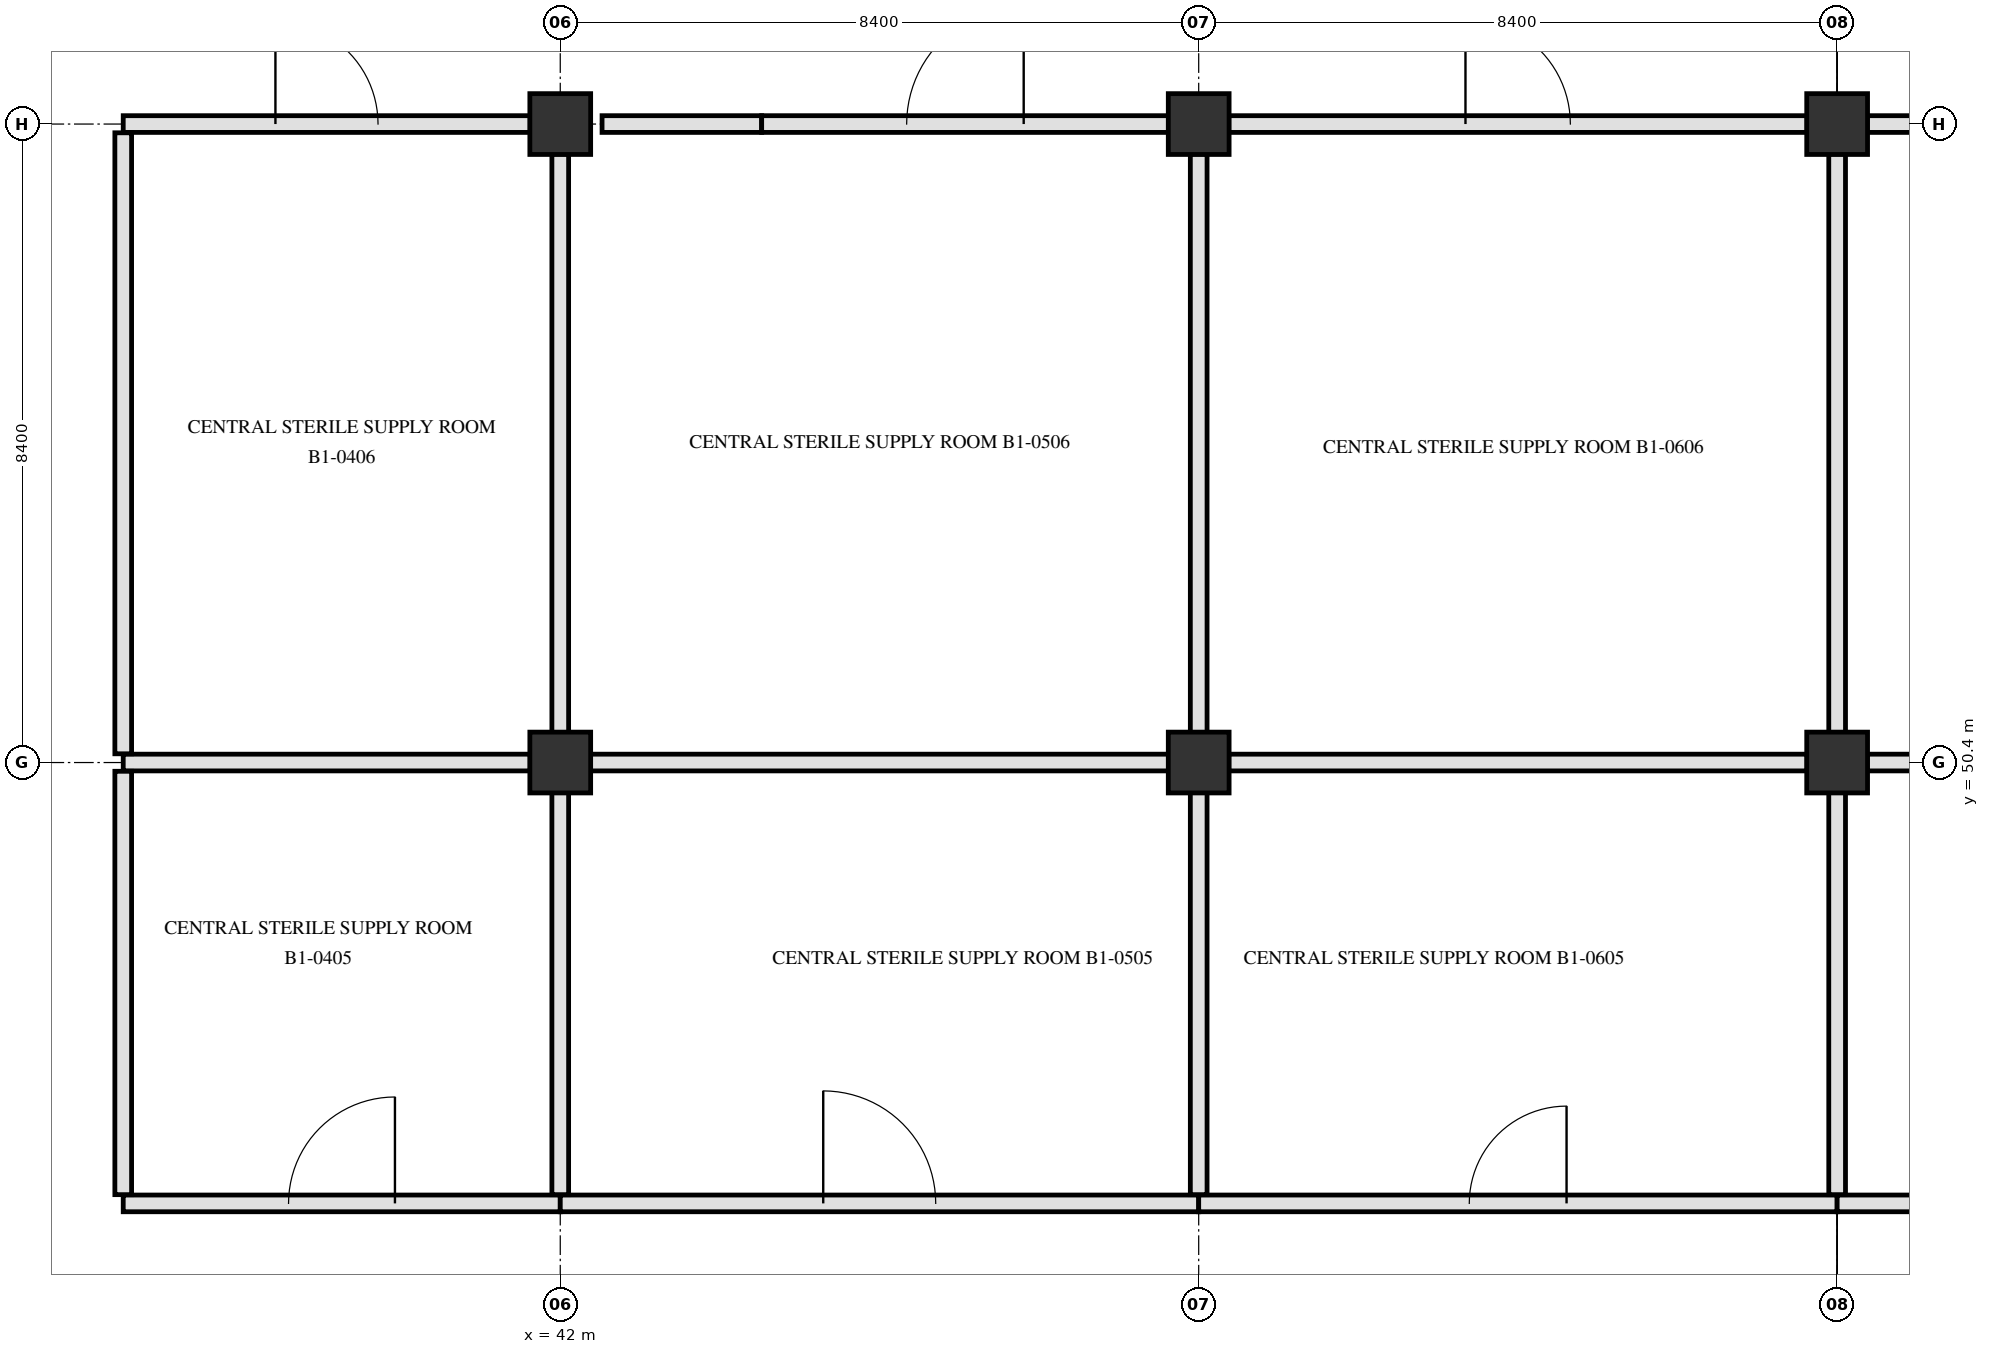
"""IFC4 building model, lengths in metres.
Left out: names, types, materials, properties, quantities, classifications, styles, units other than length and angle.
Written with IfcOpenShell. Run it as: python <this file> out.ifc"""

import sys

from ifc_helpers import new_model, si_unit, direction, frame, frame_2d, origin, origin_2d, place, context, subcontext, project, spatial, rectangle, extrude, element, fill, save


model = new_model("IFC4")
c1 = context("Model", 3, precision=1e-05, world=origin(), true_north=direction((0.0, 1.0)))
c2 = subcontext(c1, "Body", "Model", "MODEL_VIEW")
j1 = project(units=[si_unit("LENGTHUNIT", "METRE"), si_unit("PLANEANGLEUNIT", "RADIAN")], contexts=[c1])
p1 = place(None, origin())
s1 = spatial("IfcSite", under=j1, at=p1, CompositionType="ELEMENT")
p2 = place(p1, origin())
s2 = spatial("IfcBuilding", under=s1, at=p2, CompositionType="ELEMENT")
p3 = place(p2, frame((0.0, 0.0, -5.4)))
s3 = spatial("IfcBuildingStorey", under=s2, at=p3, CompositionType="ELEMENT", Elevation=-5.4)
for number, where, z_axis, x_axis in (
    (1, (42.0, 50.4, 0.0), (0.0, 0.0, 1.0), (1.0, 0.0, 0.0)),
    (2, (42.0, 58.8, 0.0), (0.0, 0.0, 1.0), (1.0, 0.0, 0.0)),
    (3, (50.4, 50.4, 0.0), (0.0, 0.0, 1.0), (1.0, 0.0, 0.0)),
    (4, (50.4, 58.8, 0.0), (0.0, 0.0, 1.0), (1.0, 0.0, 0.0)),
    (5, (58.8, 50.4, 0.0), (0.0, 0.0, 1.0), (1.0, 0.0, 0.0)),
    (6, (58.8, 58.8, 0.0), (0.0, 0.0, 1.0), (1.0, 0.0, 0.0)),
):
    element("IfcColumn", number, at=place(p3, frame(where, z_axis=z_axis, x_axis=x_axis)), inside=s3, PredefinedType="COLUMN", context=c2, shape_type="SweptSolid", body=[
        extrude(rectangle(XDim=0.8, YDim=0.8, at=origin_2d()), origin(), (0.0, 0.0, 1.0), 5.4),
    ])
p4 = place(p3, frame((36.25, 44.6, 0.0), z_axis=(0.0, 0.0, 1.0), x_axis=(1.0, 0.0, 0.0)))
e7 = element("IfcWall", 7, at=p4, inside=s3, PredefinedType="PARTITIONING", context=c2, shape_type="SweptSolid", body=[
    extrude(rectangle(XDim=5.75, YDim=0.22, at=frame_2d((2.875, 0.0))), origin(), (0.0, 0.0, 1.0), 4.47),
])
p5 = place(p4, frame((2.175, 0.0, 0.0)))
e8 = element("IfcOpeningElement", 8, at=p5, cuts=e7, PredefinedType="OPENING", context=c2, shape_type="SweptSolid", body=[
    extrude(rectangle(XDim=1.4, YDim=2.2, at=frame_2d((0.7, 1.1))), frame((0.0, 0.12, 0.0), z_axis=(0.0, -1.0, 0.0), x_axis=(1.0, 0.0, 0.0)), (0.0, 0.0, 1.0), 0.24),
])
p6 = place(p3, frame((42.0, 44.6, 0.0), z_axis=(0.0, 0.0, 1.0), x_axis=(1.0, 0.0, 0.0)))
e9 = element("IfcWall", 9, at=p6, inside=s3, PredefinedType="PARTITIONING", context=c2, shape_type="SweptSolid", body=[
    extrude(rectangle(XDim=8.4, YDim=0.22, at=frame_2d((4.2, 0.0))), origin(), (0.0, 0.0, 1.0), 4.47),
])
p7 = place(p6, frame((3.46, 0.0, 0.0)))
e10 = element("IfcOpeningElement", 10, at=p7, cuts=e9, PredefinedType="OPENING", context=c2, shape_type="SweptSolid", body=[
    extrude(rectangle(XDim=1.48, YDim=2.22, at=frame_2d((0.74, 1.11))), frame((0.0, 0.12, 0.0), z_axis=(0.0, -1.0, 0.0), x_axis=(1.0, 0.0, 0.0)), (0.0, 0.0, 1.0), 0.24),
])
p8 = place(p3, frame((50.4, 44.6, 0.0), z_axis=(0.0, 0.0, 1.0), x_axis=(1.0, 0.0, 0.0)))
e11 = element("IfcWall", 11, at=p8, inside=s3, PredefinedType="PARTITIONING", context=c2, shape_type="SweptSolid", body=[
    extrude(rectangle(XDim=8.4, YDim=0.22, at=frame_2d((4.2, 0.0))), origin(), (0.0, 0.0, 1.0), 4.47),
])
p9 = place(p8, frame((3.56, 0.0, 0.0)))
e12 = element("IfcOpeningElement", 12, at=p9, cuts=e11, PredefinedType="OPENING", context=c2, shape_type="SweptSolid", body=[
    extrude(rectangle(XDim=1.28, YDim=2.18, at=frame_2d((0.64, 1.09))), frame((0.0, 0.12, 0.0), z_axis=(0.0, -1.0, 0.0), x_axis=(1.0, 0.0, 0.0)), (0.0, 0.0, 1.0), 0.24),
])
p10 = place(p3, frame((58.8, 44.6, 0.0), z_axis=(0.0, 0.0, 1.0), x_axis=(1.0, 0.0, 0.0)))
e13 = element("IfcWall", 13, at=p10, inside=s3, PredefinedType="PARTITIONING", context=c2, shape_type="SweptSolid", body=[
    extrude(rectangle(XDim=8.4, YDim=0.22, at=frame_2d((4.2, 0.0))), origin(), (0.0, 0.0, 1.0), 4.47),
])
p11 = place(p10, frame((3.725, 0.0, 0.0)))
e14 = element("IfcOpeningElement", 14, at=p11, cuts=e13, PredefinedType="OPENING", context=c2, shape_type="SweptSolid", body=[
    extrude(rectangle(XDim=0.95, YDim=2.1, at=frame_2d((0.475, 1.05))), frame((0.0, 0.12, 0.0), z_axis=(0.0, -1.0, 0.0), x_axis=(1.0, 0.0, 0.0)), (0.0, 0.0, 1.0), 0.24),
])
p12 = place(p3, frame((36.25, 50.4, 0.0), z_axis=(0.0, 0.0, 1.0), x_axis=(1.0, 0.0, 0.0)))
e15 = element("IfcWall", 15, at=p12, inside=s3, PredefinedType="PARTITIONING", context=c2, shape_type="SweptSolid", body=[
    extrude(rectangle(XDim=5.355, YDim=0.22, at=frame_2d((2.677, 0.0))), origin(), (0.0, 0.0, 1.0), 4.42),
])
p13 = place(p3, frame((42.395, 50.4, 0.0), z_axis=(0.0, 0.0, 1.0), x_axis=(1.0, 0.0, 0.0)))
e16 = element("IfcWall", 16, at=p13, inside=s3, PredefinedType="PARTITIONING", context=c2, shape_type="SweptSolid", body=[
    extrude(rectangle(XDim=7.61, YDim=0.22, at=frame_2d((3.805, 0.0))), origin(), (0.0, 0.0, 1.0), 4.42),
])
p14 = place(p3, frame((50.795, 50.4, 0.0), z_axis=(0.0, 0.0, 1.0), x_axis=(1.0, 0.0, 0.0)))
e17 = element("IfcWall", 17, at=p14, inside=s3, PredefinedType="PARTITIONING", context=c2, shape_type="SweptSolid", body=[
    extrude(rectangle(XDim=7.61, YDim=0.22, at=frame_2d((3.805, 0.0))), origin(), (0.0, 0.0, 1.0), 4.42),
])
p15 = place(p3, frame((59.195, 50.4, 0.0), z_axis=(0.0, 0.0, 1.0), x_axis=(1.0, 0.0, 0.0)))
e18 = element("IfcWall", 18, at=p15, inside=s3, PredefinedType="PARTITIONING", context=c2, shape_type="SweptSolid", body=[
    extrude(rectangle(XDim=7.61, YDim=0.22, at=frame_2d((3.805, 0.0))), origin(), (0.0, 0.0, 1.0), 4.42),
])
p16 = place(p3, frame((36.25, 58.8, 0.0), z_axis=(0.0, 0.0, 1.0), x_axis=(1.0, 0.0, 0.0)))
e19 = element("IfcWall", 19, at=p16, inside=s3, PredefinedType="PARTITIONING", context=c2, shape_type="SweptSolid", body=[
    extrude(rectangle(XDim=5.355, YDim=0.22, at=frame_2d((2.677, 0.0))), origin(), (0.0, 0.0, 1.0), 4.42),
])
p17 = place(p16, frame((2.002, 0.0, 0.0)))
e20 = element("IfcOpeningElement", 20, at=p17, cuts=e19, PredefinedType="OPENING", context=c2, shape_type="SweptSolid", body=[
    extrude(rectangle(XDim=1.35, YDim=2.2, at=frame_2d((0.675, 1.1))), frame((0.0, 0.12, 0.0), z_axis=(0.0, -1.0, 0.0), x_axis=(1.0, 0.0, 0.0)), (0.0, 0.0, 1.0), 0.24),
])
p18 = place(p3, frame((42.55, 58.8, 0.0), z_axis=(0.0, 0.0, 1.0), x_axis=(1.0, 0.0, 0.0)))
e21 = element("IfcWall", 21, at=p18, inside=s3, PredefinedType="PARTITIONING", context=c2, shape_type="SweptSolid", body=[
    extrude(rectangle(XDim=2.1, YDim=0.22, at=frame_2d((1.05, 0.0))), origin(), (0.0, 0.0, 1.0), 4.42),
])
p19 = place(p3, frame((44.65, 58.8, 0.0), z_axis=(0.0, 0.0, 1.0), x_axis=(1.0, 0.0, 0.0)))
e22 = element("IfcWall", 22, at=p19, inside=s3, PredefinedType="PARTITIONING", context=c2, shape_type="SweptSolid", body=[
    extrude(rectangle(XDim=5.355, YDim=0.22, at=frame_2d((2.677, 0.0))), origin(), (0.0, 0.0, 1.0), 4.42),
])
p20 = place(p19, frame((1.907, 0.0, 0.0)))
e23 = element("IfcOpeningElement", 23, at=p20, cuts=e22, PredefinedType="OPENING", context=c2, shape_type="SweptSolid", body=[
    extrude(rectangle(XDim=1.54, YDim=2.24, at=frame_2d((0.77, 1.12))), frame((0.0, 0.12, 0.0), z_axis=(0.0, -1.0, 0.0), x_axis=(1.0, 0.0, 0.0)), (0.0, 0.0, 1.0), 0.24),
])
p21 = place(p3, frame((50.795, 58.8, 0.0), z_axis=(0.0, 0.0, 1.0), x_axis=(1.0, 0.0, 0.0)))
e24 = element("IfcWall", 24, at=p21, inside=s3, PredefinedType="PARTITIONING", context=c2, shape_type="SweptSolid", body=[
    extrude(rectangle(XDim=7.61, YDim=0.22, at=frame_2d((3.805, 0.0))), origin(), (0.0, 0.0, 1.0), 4.42),
])
p22 = place(p21, frame((3.115, 0.0, 0.0)))
e25 = element("IfcOpeningElement", 25, at=p22, cuts=e24, PredefinedType="OPENING", context=c2, shape_type="SweptSolid", body=[
    extrude(rectangle(XDim=1.38, YDim=2.22, at=frame_2d((0.69, 1.11))), frame((0.0, 0.12, 0.0), z_axis=(0.0, -1.0, 0.0), x_axis=(1.0, 0.0, 0.0)), (0.0, 0.0, 1.0), 0.24),
])
p23 = place(p3, frame((59.195, 58.8, 0.0), z_axis=(0.0, 0.0, 1.0), x_axis=(1.0, 0.0, 0.0)))
e26 = element("IfcWall", 26, at=p23, inside=s3, PredefinedType="PARTITIONING", context=c2, shape_type="SweptSolid", body=[
    extrude(rectangle(XDim=7.61, YDim=0.22, at=frame_2d((3.805, 0.0))), origin(), (0.0, 0.0, 1.0), 4.42),
])
p24 = place(p23, frame((3.255, 0.0, 0.0)))
e27 = element("IfcOpeningElement", 27, at=p24, cuts=e26, PredefinedType="OPENING", context=c2, shape_type="SweptSolid", body=[
    extrude(rectangle(XDim=1.1, YDim=2.15, at=frame_2d((0.55, 1.075))), frame((0.0, 0.12, 0.0), z_axis=(0.0, -1.0, 0.0), x_axis=(1.0, 0.0, 0.0)), (0.0, 0.0, 1.0), 0.24),
])
p25 = place(p3, frame((36.25, 44.715, 0.0), z_axis=(0.0, 0.0, 1.0), x_axis=(0.0, 1.0, 0.0)))
e28 = element("IfcWall", 28, at=p25, inside=s3, PredefinedType="PARTITIONING", context=c2, shape_type="SweptSolid", body=[
    extrude(rectangle(XDim=5.57, YDim=0.22, at=frame_2d((2.785, 0.0))), origin(), (0.0, 0.0, 1.0), 4.42),
])
p26 = place(p3, frame((36.25, 50.515, 0.0), z_axis=(0.0, 0.0, 1.0), x_axis=(0.0, 1.0, 0.0)))
e29 = element("IfcWall", 29, at=p26, inside=s3, PredefinedType="PARTITIONING", context=c2, shape_type="SweptSolid", body=[
    extrude(rectangle(XDim=8.17, YDim=0.22, at=frame_2d((4.085, 0.0))), origin(), (0.0, 0.0, 1.0), 4.42),
])
p27 = place(p3, frame((42.0, 44.715, 0.0), z_axis=(0.0, 0.0, 1.0), x_axis=(0.0, 1.0, 0.0)))
e30 = element("IfcWall", 30, at=p27, inside=s3, PredefinedType="PARTITIONING", context=c2, shape_type="SweptSolid", body=[
    extrude(rectangle(XDim=5.29, YDim=0.22, at=frame_2d((2.645, 0.0))), origin(), (0.0, 0.0, 1.0), 4.47),
])
p28 = place(p3, frame((42.0, 50.795, 0.0), z_axis=(0.0, 0.0, 1.0), x_axis=(0.0, 1.0, 0.0)))
e31 = element("IfcWall", 31, at=p28, inside=s3, PredefinedType="PARTITIONING", context=c2, shape_type="SweptSolid", body=[
    extrude(rectangle(XDim=7.61, YDim=0.22, at=frame_2d((3.805, 0.0))), origin(), (0.0, 0.0, 1.0), 4.47),
])
p29 = place(p3, frame((50.4, 44.715, 0.0), z_axis=(0.0, 0.0, 1.0), x_axis=(0.0, 1.0, 0.0)))
e32 = element("IfcWall", 32, at=p29, inside=s3, PredefinedType="PARTITIONING", context=c2, shape_type="SweptSolid", body=[
    extrude(rectangle(XDim=5.29, YDim=0.22, at=frame_2d((2.645, 0.0))), origin(), (0.0, 0.0, 1.0), 4.47),
])
p30 = place(p3, frame((50.4, 50.795, 0.0), z_axis=(0.0, 0.0, 1.0), x_axis=(0.0, 1.0, 0.0)))
e33 = element("IfcWall", 33, at=p30, inside=s3, PredefinedType="PARTITIONING", context=c2, shape_type="SweptSolid", body=[
    extrude(rectangle(XDim=7.61, YDim=0.22, at=frame_2d((3.805, 0.0))), origin(), (0.0, 0.0, 1.0), 4.47),
])
p31 = place(p3, frame((58.8, 44.715, 0.0), z_axis=(0.0, 0.0, 1.0), x_axis=(0.0, 1.0, 0.0)))
e34 = element("IfcWall", 34, at=p31, inside=s3, PredefinedType="PARTITIONING", context=c2, shape_type="SweptSolid", body=[
    extrude(rectangle(XDim=5.29, YDim=0.22, at=frame_2d((2.645, 0.0))), origin(), (0.0, 0.0, 1.0), 4.47),
])
p32 = place(p3, frame((58.8, 50.795, 0.0), z_axis=(0.0, 0.0, 1.0), x_axis=(0.0, 1.0, 0.0)))
e35 = element("IfcWall", 35, at=p32, inside=s3, PredefinedType="PARTITIONING", context=c2, shape_type="SweptSolid", body=[
    extrude(rectangle(XDim=7.61, YDim=0.22, at=frame_2d((3.805, 0.0))), origin(), (0.0, 0.0, 1.0), 4.47),
])
p33 = place(p5, origin())
e36 = element("IfcDoor", 36, at=p33, inside=s3, OperationType="SINGLE_SWING_RIGHT", PredefinedType="DOOR", context=c2, shape_type="SweptSolid", body=[
    extrude(rectangle(XDim=1.4, YDim=2.2, at=frame_2d((0.7, 1.1))), frame((0.0, 0.025, 0.0), z_axis=(0.0, -1.0, 0.0), x_axis=(1.0, 0.0, 0.0)), (0.0, 0.0, 1.0), 0.05),
])
fill(e8, e36)
p34 = place(p17, origin())
e37 = element("IfcDoor", 37, at=p34, inside=s3, OperationType="SINGLE_SWING_LEFT", PredefinedType="DOOR", context=c2, shape_type="SweptSolid", body=[
    extrude(rectangle(XDim=1.35, YDim=2.2, at=frame_2d((0.675, 1.1))), frame((0.0, 0.025, 0.0), z_axis=(0.0, -1.0, 0.0), x_axis=(1.0, 0.0, 0.0)), (0.0, 0.0, 1.0), 0.05),
])
fill(e20, e37)
p35 = place(p7, origin())
e38 = element("IfcDoor", 38, at=p35, inside=s3, OperationType="SINGLE_SWING_LEFT", PredefinedType="DOOR", context=c2, shape_type="SweptSolid", body=[
    extrude(rectangle(XDim=1.48, YDim=2.22, at=frame_2d((0.74, 1.11))), frame((0.0, 0.025, 0.0), z_axis=(0.0, -1.0, 0.0), x_axis=(1.0, 0.0, 0.0)), (0.0, 0.0, 1.0), 0.05),
])
fill(e10, e38)
p36 = place(p20, origin())
e39 = element("IfcDoor", 39, at=p36, inside=s3, OperationType="SINGLE_SWING_RIGHT", PredefinedType="DOOR", context=c2, shape_type="SweptSolid", body=[
    extrude(rectangle(XDim=1.54, YDim=2.24, at=frame_2d((0.77, 1.12))), frame((0.0, 0.025, 0.0), z_axis=(0.0, -1.0, 0.0), x_axis=(1.0, 0.0, 0.0)), (0.0, 0.0, 1.0), 0.05),
])
fill(e23, e39)
p37 = place(p9, origin())
e40 = element("IfcDoor", 40, at=p37, inside=s3, OperationType="SINGLE_SWING_RIGHT", PredefinedType="DOOR", context=c2, shape_type="SweptSolid", body=[
    extrude(rectangle(XDim=1.28, YDim=2.18, at=frame_2d((0.64, 1.09))), frame((0.0, 0.025, 0.0), z_axis=(0.0, -1.0, 0.0), x_axis=(1.0, 0.0, 0.0)), (0.0, 0.0, 1.0), 0.05),
])
fill(e12, e40)
p38 = place(p22, origin())
e41 = element("IfcDoor", 41, at=p38, inside=s3, OperationType="SINGLE_SWING_LEFT", PredefinedType="DOOR", context=c2, shape_type="SweptSolid", body=[
    extrude(rectangle(XDim=1.38, YDim=2.22, at=frame_2d((0.69, 1.11))), frame((0.0, 0.025, 0.0), z_axis=(0.0, -1.0, 0.0), x_axis=(1.0, 0.0, 0.0)), (0.0, 0.0, 1.0), 0.05),
])
fill(e25, e41)
save(model, sys.argv[1])
